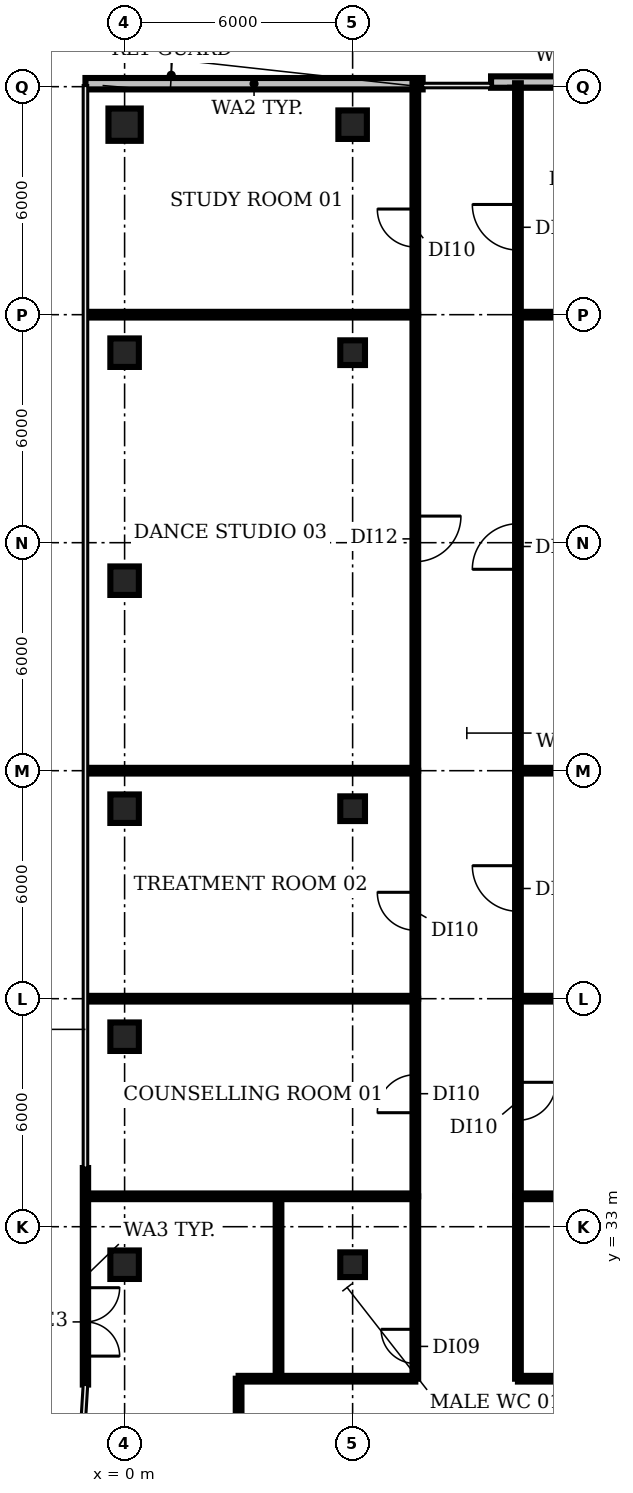
"""IFC4 building model, lengths in metres.
Left out: names, types, materials, properties, quantities, classifications, styles, units other than length and angle.
Written with IfcOpenShell. Run it as: python <this file> out.ifc"""

import sys

from ifc_helpers import new_model, si_unit, direction, frame, frame_2d, origin, origin_2d, place, context, subcontext, project, spatial, rectangle, circle, extrude, element, fill, save


model = new_model("IFC4")
c1 = context("Model", 3, precision=1e-05, world=origin(), true_north=direction((0.0, 1.0)))
c2 = subcontext(c1, "Body", "Model", "MODEL_VIEW")
j1 = project(units=[si_unit("LENGTHUNIT", "METRE"), si_unit("PLANEANGLEUNIT", "RADIAN")], contexts=[c1])
p1 = place(None, origin())
s1 = spatial("IfcSite", under=j1, at=p1, CompositionType="ELEMENT")
p2 = place(p1, origin())
s2 = spatial("IfcBuilding", under=s1, at=p2, CompositionType="ELEMENT")
p3 = place(p2, frame((0.0, 0.0, 272.6)))
s3 = spatial("IfcBuildingStorey", under=s2, at=p3, CompositionType="ELEMENT", Elevation=272.6)
for number, where, z_axis, x_axis in (
    (1, (0.0, 32.0, 0.0), (0.0, 0.0, 1.0), (1.0, 0.0, 0.0)),
    (2, (0.0, 38.0, 0.0), (0.0, 0.0, 1.0), (1.0, 0.0, 0.0)),
    (3, (0.0, 44.0, 0.0), (0.0, 0.0, 1.0), (1.0, 0.0, 0.0)),
    (4, (0.0, 50.0, 0.0), (0.0, 0.0, 1.0), (1.0, 0.0, 0.0)),
    (5, (0.0, 56.0, 0.0), (0.0, 0.0, 1.0), (1.0, 0.0, 0.0)),
):
    element("IfcColumn", number, at=place(p3, frame(where, z_axis=z_axis, x_axis=x_axis)), inside=s3, PredefinedType="COLUMN", context=c2, shape_type="SweptSolid", body=[
        extrude(rectangle(XDim=0.75, YDim=0.75, at=origin_2d()), origin(), (0.0, 0.0, 1.0), 3.85),
    ])
p4 = place(p3, frame((0.0, 62.0, 0.0), z_axis=(0.0, 0.0, 1.0), x_axis=(1.0, 0.0, 0.0)))
e6 = element("IfcColumn", 6, at=p4, inside=s3, PredefinedType="COLUMN", context=c2, shape_type="SweptSolid", body=[
    extrude(circle(Radius=0.425, at=origin_2d()), origin(), (0.0, 0.0, 1.0), 3.85),
])
for number, where, z_axis, x_axis in (
    (7, (6.0, 32.0, 0.0), (0.0, 0.0, 1.0), (1.0, 0.0, 0.0)),
    (8, (6.0, 44.0, 0.0), (0.0, 0.0, 1.0), (1.0, 0.0, 0.0)),
    (9, (6.0, 56.0, 0.0), (0.0, 0.0, 1.0), (1.0, 0.0, 0.0)),
):
    element("IfcColumn", number, at=place(p3, frame(where, z_axis=z_axis, x_axis=x_axis)), inside=s3, PredefinedType="COLUMN", context=c2, shape_type="SweptSolid", body=[
        extrude(rectangle(XDim=0.65, YDim=0.65, at=origin_2d()), origin(), (0.0, 0.0, 1.0), 3.85),
    ])
p5 = place(p3, frame((6.0, 62.0, 0.0), z_axis=(0.0, 0.0, 1.0), x_axis=(1.0, 0.0, 0.0)))
e10 = element("IfcColumn", 10, at=p5, inside=s3, PredefinedType="COLUMN", context=c2, shape_type="SweptSolid", body=[
    extrude(rectangle(XDim=0.75, YDim=0.75, at=origin_2d()), origin(), (0.0, 0.0, 1.0), 3.85),
])
p6 = place(p3, frame((14.357, 63.122, 0.0), z_axis=(0.0, 0.0, 1.0), x_axis=(-1.0, 0.0, 0.0)))
e11 = element("IfcWall", 11, at=p6, inside=s3, PredefinedType="SOLIDWALL", context=c2, shape_type="SweptSolid", body=[
    extrude(rectangle(XDim=4.715, YDim=0.3, at=frame_2d((2.357, 0.0))), origin(), (0.0, 0.0, 1.0), 3.85),
])
p7 = place(p3, frame((7.843, 63.078, 0.0), z_axis=(0.0, 0.0, 1.0), x_axis=(-1.0, 0.0, 0.0)))
e12 = element("IfcWall", 12, at=p7, inside=s3, PredefinedType="SOLIDWALL", context=c2, shape_type="SweptSolid", body=[
    extrude(rectangle(XDim=8.873, YDim=0.3, at=frame_2d((4.436, 0.0))), origin(), (0.0, 0.0, 1.0), 3.85),
])
p8 = place(p3, frame((-1.03, 34.544, 0.0), z_axis=(0.0, 0.0, 1.0), x_axis=(0.0, -1.0, 0.0)))
e13 = element("IfcWall", 13, at=p8, inside=s3, PredefinedType="SOLIDWALL", context=c2, shape_type="SweptSolid", body=[
    extrude(rectangle(XDim=5.697, YDim=0.14, at=frame_2d((2.849, 0.0))), origin(), (0.0, 0.0, 1.0), 3.85),
])
p9 = place(p8, frame((3.149, 0.0, 0.0)))
e14 = element("IfcOpeningElement", 14, at=p9, cuts=e13, PredefinedType="OPENING", context=c2, shape_type="SweptSolid", body=[
    extrude(rectangle(XDim=1.8, YDim=2.4, at=frame_2d((0.9, 1.2))), frame((0.0, 0.08, 0.0), z_axis=(0.0, -1.0, 0.0), x_axis=(1.0, 0.0, 0.0)), (0.0, 0.0, 1.0), 0.16),
])
for number, where, z_axis, x_axis in (
    (15, (-0.98, 33.8, 0.0), (0.0, 0.0, 1.0), (1.0, 0.0, 0.0)),
    (16, (-0.98, 39.0, 0.0), (0.0, 0.0, 1.0), (1.0, 0.0, 0.0)),
    (17, (-0.98, 45.0, 0.0), (0.0, 0.0, 1.0), (1.0, 0.0, 0.0)),
    (18, (-0.98, 57.0, 0.0), (0.0, 0.0, 1.0), (1.0, 0.0, 0.0)),
):
    element("IfcWall", number, at=place(p3, frame(where, z_axis=z_axis, x_axis=x_axis)), inside=s3, PredefinedType="PARTITIONING", context=c2, shape_type="SweptSolid", body=[
        extrude(rectangle(XDim=8.63, YDim=0.15, at=frame_2d((4.315, 0.0))), origin(), (0.0, 0.0, 1.0), 2.9),
    ])
p10 = place(p3, frame((3.0, 25.1, 0.0), z_axis=(0.0, 0.0, 1.0), x_axis=(0.0, 1.0, 0.0)))
e19 = element("IfcWall", 19, at=p10, inside=s3, PredefinedType="PARTITIONING", context=c2, shape_type="SweptSolid", body=[
    extrude(rectangle(XDim=3.9, YDim=0.15, at=frame_2d((1.95, 0.0))), origin(), (0.0, 0.0, 1.0), 2.9),
])
p11 = place(p3, frame((3.0, 29.0, 0.0), z_axis=(0.0, 0.0, 1.0), x_axis=(1.0, 0.0, 0.0)))
e20 = element("IfcWall", 20, at=p11, inside=s3, PredefinedType="PARTITIONING", context=c2, shape_type="SweptSolid", body=[
    extrude(rectangle(XDim=4.65, YDim=0.15, at=frame_2d((2.325, 0.0))), origin(), (0.0, 0.0, 1.0), 2.9),
])
p12 = place(p3, frame((4.05, 29.0, 0.0), z_axis=(0.0, 0.0, 1.0), x_axis=(0.0, 1.0, 0.0)))
e21 = element("IfcWall", 21, at=p12, inside=s3, PredefinedType="PARTITIONING", context=c2, shape_type="SweptSolid", body=[
    extrude(rectangle(XDim=4.8, YDim=0.15, at=frame_2d((2.4, 0.0))), origin(), (0.0, 0.0, 1.0), 2.9),
])
p13 = place(p3, frame((7.65, 29.0, 0.0), z_axis=(0.0, 0.0, 1.0), x_axis=(0.0, 1.0, 0.0)))
e22 = element("IfcWall", 22, at=p13, inside=s3, PredefinedType="PARTITIONING", context=c2, shape_type="SweptSolid", body=[
    extrude(rectangle(XDim=4.8, YDim=0.15, at=frame_2d((2.4, 0.0))), origin(), (0.0, 0.0, 1.0), 2.9),
])
p14 = place(p13, frame((0.4, 0.0, 0.0)))
e23 = element("IfcOpeningElement", 23, at=p14, cuts=e22, PredefinedType="OPENING", context=c2, shape_type="SweptSolid", body=[
    extrude(rectangle(XDim=0.9, YDim=2.1, at=frame_2d((0.45, 1.05))), frame((0.0, 0.085, 0.0), z_axis=(0.0, -1.0, 0.0), x_axis=(1.0, 0.0, 0.0)), (0.0, 0.0, 1.0), 0.17),
])
p15 = place(p3, frame((7.65, 33.8, 0.0), z_axis=(0.0, 0.0, 1.0), x_axis=(0.0, 1.0, 0.0)))
e24 = element("IfcWall", 24, at=p15, inside=s3, PredefinedType="PARTITIONING", context=c2, shape_type="SweptSolid", body=[
    extrude(rectangle(XDim=5.2, YDim=0.15, at=frame_2d((2.6, 0.0))), origin(), (0.0, 0.0, 1.0), 2.9),
])
p16 = place(p15, frame((2.2, 0.0, 0.0)))
e25 = element("IfcOpeningElement", 25, at=p16, cuts=e24, PredefinedType="OPENING", context=c2, shape_type="SweptSolid", body=[
    extrude(rectangle(XDim=1.0, YDim=2.1, at=frame_2d((0.5, 1.05))), frame((0.0, 0.085, 0.0), z_axis=(0.0, -1.0, 0.0), x_axis=(1.0, 0.0, 0.0)), (0.0, 0.0, 1.0), 0.17),
])
p17 = place(p3, frame((7.65, 39.0, 0.0), z_axis=(0.0, 0.0, 1.0), x_axis=(0.0, 1.0, 0.0)))
e26 = element("IfcWall", 26, at=p17, inside=s3, PredefinedType="PARTITIONING", context=c2, shape_type="SweptSolid", body=[
    extrude(rectangle(XDim=6.0, YDim=0.15, at=frame_2d((3.0, 0.0))), origin(), (0.0, 0.0, 1.0), 2.9),
])
p18 = place(p17, frame((1.8, 0.0, 0.0)))
e27 = element("IfcOpeningElement", 27, at=p18, cuts=e26, PredefinedType="OPENING", context=c2, shape_type="SweptSolid", body=[
    extrude(rectangle(XDim=1.0, YDim=2.1, at=frame_2d((0.5, 1.05))), frame((0.0, 0.085, 0.0), z_axis=(0.0, -1.0, 0.0), x_axis=(1.0, 0.0, 0.0)), (0.0, 0.0, 1.0), 0.17),
])
p19 = place(p3, frame((7.65, 57.0, 0.0), z_axis=(0.0, 0.0, 1.0), x_axis=(0.0, -1.0, 0.0)))
e28 = element("IfcWall", 28, at=p19, inside=s3, PredefinedType="PARTITIONING", context=c2, shape_type="SweptSolid", body=[
    extrude(rectangle(XDim=12.0, YDim=0.15, at=frame_2d((6.0, 0.0))), origin(), (0.0, 0.0, 1.0), 2.9),
])
p20 = place(p19, frame((5.3, 0.0, 0.0)))
e29 = element("IfcOpeningElement", 29, at=p20, cuts=e28, PredefinedType="OPENING", context=c2, shape_type="SweptSolid", body=[
    extrude(rectangle(XDim=1.2, YDim=2.1, at=frame_2d((0.6, 1.05))), frame((0.0, 0.085, 0.0), z_axis=(0.0, -1.0, 0.0), x_axis=(1.0, 0.0, 0.0)), (0.0, 0.0, 1.0), 0.17),
])
p21 = place(p3, frame((7.65, 57.0, 0.0), z_axis=(0.0, 0.0, 1.0), x_axis=(0.0, 1.0, 0.0)))
e30 = element("IfcWall", 30, at=p21, inside=s3, PredefinedType="PARTITIONING", context=c2, shape_type="SweptSolid", body=[
    extrude(rectangle(XDim=6.09, YDim=0.15, at=frame_2d((3.045, 0.0))), origin(), (0.0, 0.0, 1.0), 2.9),
])
p22 = place(p21, frame((1.78, 0.0, 0.0)))
e31 = element("IfcOpeningElement", 31, at=p22, cuts=e30, PredefinedType="OPENING", context=c2, shape_type="SweptSolid", body=[
    extrude(rectangle(XDim=1.0, YDim=2.1, at=frame_2d((0.5, 1.05))), frame((0.0, 0.085, 0.0), z_axis=(0.0, -1.0, 0.0), x_axis=(1.0, 0.0, 0.0)), (0.0, 0.0, 1.0), 0.17),
])
p23 = place(p3, frame((10.35, 29.0, 0.0), z_axis=(0.0, 0.0, 1.0), x_axis=(0.0, 1.0, 0.0)))
e32 = element("IfcWall", 32, at=p23, inside=s3, PredefinedType="PARTITIONING", context=c2, shape_type="SweptSolid", body=[
    extrude(rectangle(XDim=4.8, YDim=0.15, at=frame_2d((2.4, 0.0))), origin(), (0.0, 0.0, 1.0), 2.9),
])
p24 = place(p3, frame((10.35, 29.0, 0.0), z_axis=(0.0, 0.0, 1.0), x_axis=(1.0, 0.0, 0.0)))
e33 = element("IfcWall", 33, at=p24, inside=s3, PredefinedType="PARTITIONING", context=c2, shape_type="SweptSolid", body=[
    extrude(rectangle(XDim=4.05, YDim=0.15, at=frame_2d((2.025, 0.0))), origin(), (0.0, 0.0, 1.0), 2.9),
])
p25 = place(p3, frame((10.35, 33.8, 0.0), z_axis=(0.0, 0.0, 1.0), x_axis=(1.0, 0.0, 0.0)))
e34 = element("IfcWall", 34, at=p25, inside=s3, PredefinedType="PARTITIONING", context=c2, shape_type="SweptSolid", body=[
    extrude(rectangle(XDim=11.38, YDim=0.15, at=frame_2d((5.69, 0.0))), origin(), (0.0, 0.0, 1.0), 2.9),
])
p26 = place(p3, frame((10.35, 39.0, 0.0), z_axis=(0.0, 0.0, 1.0), x_axis=(0.0, -1.0, 0.0)))
e35 = element("IfcWall", 35, at=p26, inside=s3, PredefinedType="PARTITIONING", context=c2, shape_type="SweptSolid", body=[
    extrude(rectangle(XDim=5.2, YDim=0.15, at=frame_2d((2.6, 0.0))), origin(), (0.0, 0.0, 1.0), 2.9),
])
p27 = place(p26, frame((2.2, 0.0, 0.0)))
e36 = element("IfcOpeningElement", 36, at=p27, cuts=e35, PredefinedType="OPENING", context=c2, shape_type="SweptSolid", body=[
    extrude(rectangle(XDim=1.0, YDim=2.1, at=frame_2d((0.5, 1.05))), frame((0.0, 0.085, 0.0), z_axis=(0.0, -1.0, 0.0), x_axis=(1.0, 0.0, 0.0)), (0.0, 0.0, 1.0), 0.17),
])
p28 = place(p3, frame((10.35, 39.0, 0.0), z_axis=(0.0, 0.0, 1.0), x_axis=(0.0, 1.0, 0.0)))
e37 = element("IfcWall", 37, at=p28, inside=s3, PredefinedType="PARTITIONING", context=c2, shape_type="SweptSolid", body=[
    extrude(rectangle(XDim=6.0, YDim=0.15, at=frame_2d((3.0, 0.0))), origin(), (0.0, 0.0, 1.0), 2.9),
])
p29 = place(p28, frame((2.3, 0.0, 0.0)))
e38 = element("IfcOpeningElement", 38, at=p29, cuts=e37, PredefinedType="OPENING", context=c2, shape_type="SweptSolid", body=[
    extrude(rectangle(XDim=1.2, YDim=2.1, at=frame_2d((0.6, 1.05))), frame((0.0, 0.085, 0.0), z_axis=(0.0, -1.0, 0.0), x_axis=(1.0, 0.0, 0.0)), (0.0, 0.0, 1.0), 0.17),
])
p30 = place(p3, frame((10.35, 39.0, 0.0), z_axis=(0.0, 0.0, 1.0), x_axis=(1.0, 0.0, 0.0)))
e39 = element("IfcWall", 39, at=p30, inside=s3, PredefinedType="PARTITIONING", context=c2, shape_type="SweptSolid", body=[
    extrude(rectangle(XDim=15.3, YDim=0.15, at=frame_2d((7.65, 0.0))), origin(), (0.0, 0.0, 1.0), 2.9),
])
p31 = place(p3, frame((10.35, 45.0, 0.0), z_axis=(0.0, 0.0, 1.0), x_axis=(0.0, 1.0, 0.0)))
e40 = element("IfcWall", 40, at=p31, inside=s3, PredefinedType="PARTITIONING", context=c2, shape_type="SweptSolid", body=[
    extrude(rectangle(XDim=12.0, YDim=0.15, at=frame_2d((6.0, 0.0))), origin(), (0.0, 0.0, 1.0), 2.9),
])
p32 = place(p31, frame((5.3, 0.0, 0.0)))
e41 = element("IfcOpeningElement", 41, at=p32, cuts=e40, PredefinedType="OPENING", context=c2, shape_type="SweptSolid", body=[
    extrude(rectangle(XDim=1.2, YDim=2.1, at=frame_2d((0.6, 1.05))), frame((0.0, 0.085, 0.0), z_axis=(0.0, -1.0, 0.0), x_axis=(1.0, 0.0, 0.0)), (0.0, 0.0, 1.0), 0.17),
])
p33 = place(p3, frame((10.35, 45.0, 0.0), z_axis=(0.0, 0.0, 1.0), x_axis=(1.0, 0.0, 0.0)))
e42 = element("IfcWall", 42, at=p33, inside=s3, PredefinedType="PARTITIONING", context=c2, shape_type="SweptSolid", body=[
    extrude(rectangle(XDim=15.67, YDim=0.15, at=frame_2d((7.835, 0.0))), origin(), (0.0, 0.0, 1.0), 2.9),
])
p34 = place(p3, frame((10.35, 57.0, 0.0), z_axis=(0.0, 0.0, 1.0), x_axis=(0.0, 1.0, 0.0)))
e43 = element("IfcWall", 43, at=p34, inside=s3, PredefinedType="PARTITIONING", context=c2, shape_type="SweptSolid", body=[
    extrude(rectangle(XDim=6.09, YDim=0.15, at=frame_2d((3.045, 0.0))), origin(), (0.0, 0.0, 1.0), 2.9),
])
p35 = place(p34, frame((1.7, 0.0, 0.0)))
e44 = element("IfcOpeningElement", 44, at=p35, cuts=e43, PredefinedType="OPENING", context=c2, shape_type="SweptSolid", body=[
    extrude(rectangle(XDim=1.2, YDim=2.1, at=frame_2d((0.6, 1.05))), frame((0.0, 0.085, 0.0), z_axis=(0.0, -1.0, 0.0), x_axis=(1.0, 0.0, 0.0)), (0.0, 0.0, 1.0), 0.17),
])
p36 = place(p3, frame((10.35, 57.0, 0.0), z_axis=(0.0, 0.0, 1.0), x_axis=(1.0, 0.0, 0.0)))
e45 = element("IfcWall", 45, at=p36, inside=s3, PredefinedType="PARTITIONING", context=c2, shape_type="SweptSolid", body=[
    extrude(rectangle(XDim=16.4, YDim=0.15, at=frame_2d((8.2, 0.0))), origin(), (0.0, 0.0, 1.0), 2.9),
])
p37 = place(p9, origin())
e46 = element("IfcDoor", 46, at=p37, inside=s3, OperationType="DOUBLE_DOOR_DOUBLE_SWING", PredefinedType="DOOR", context=c2, shape_type="SweptSolid", body=[
    extrude(rectangle(XDim=1.8, YDim=2.4, at=frame_2d((0.9, 1.2))), frame((0.0, 0.025, 0.0), z_axis=(0.0, -1.0, 0.0), x_axis=(1.0, 0.0, 0.0)), (0.0, 0.0, 1.0), 0.05),
])
fill(e14, e46)
p38 = place(p14, origin())
e47 = element("IfcDoor", 47, at=p38, inside=s3, OperationType="SINGLE_SWING_RIGHT", PredefinedType="DOOR", context=c2, shape_type="SweptSolid", body=[
    extrude(rectangle(XDim=0.9, YDim=2.1, at=frame_2d((0.45, 1.05))), frame((0.0, 0.025, 0.0), z_axis=(0.0, -1.0, 0.0), x_axis=(1.0, 0.0, 0.0)), (0.0, 0.0, 1.0), 0.05),
])
fill(e23, e47)
p39 = place(p16, origin())
e48 = element("IfcDoor", 48, at=p39, inside=s3, OperationType="SINGLE_SWING_LEFT", PredefinedType="DOOR", context=c2, shape_type="SweptSolid", body=[
    extrude(rectangle(XDim=1.0, YDim=2.1, at=frame_2d((0.5, 1.05))), frame((0.0, 0.025, 0.0), z_axis=(0.0, -1.0, 0.0), x_axis=(1.0, 0.0, 0.0)), (0.0, 0.0, 1.0), 0.05),
])
fill(e25, e48)
p40 = place(p18, origin())
e49 = element("IfcDoor", 49, at=p40, inside=s3, OperationType="SINGLE_SWING_RIGHT", PredefinedType="DOOR", context=c2, shape_type="SweptSolid", body=[
    extrude(rectangle(XDim=1.0, YDim=2.1, at=frame_2d((0.5, 1.05))), frame((0.0, 0.025, 0.0), z_axis=(0.0, -1.0, 0.0), x_axis=(1.0, 0.0, 0.0)), (0.0, 0.0, 1.0), 0.05),
])
fill(e27, e49)
p41 = place(p20, origin())
e50 = element("IfcDoor", 50, at=p41, inside=s3, OperationType="SINGLE_SWING_LEFT", PredefinedType="DOOR", context=c2, shape_type="SweptSolid", body=[
    extrude(rectangle(XDim=1.2, YDim=2.1, at=frame_2d((0.6, 1.05))), frame((0.0, 0.025, 0.0), z_axis=(0.0, -1.0, 0.0), x_axis=(1.0, 0.0, 0.0)), (0.0, 0.0, 1.0), 0.05),
])
fill(e29, e50)
p42 = place(p22, origin())
e51 = element("IfcDoor", 51, at=p42, inside=s3, OperationType="SINGLE_SWING_RIGHT", PredefinedType="DOOR", context=c2, shape_type="SweptSolid", body=[
    extrude(rectangle(XDim=1.0, YDim=2.1, at=frame_2d((0.5, 1.05))), frame((0.0, 0.025, 0.0), z_axis=(0.0, -1.0, 0.0), x_axis=(1.0, 0.0, 0.0)), (0.0, 0.0, 1.0), 0.05),
])
fill(e31, e51)
p43 = place(p27, origin())
e52 = element("IfcDoor", 52, at=p43, inside=s3, OperationType="SINGLE_SWING_LEFT", PredefinedType="DOOR", context=c2, shape_type="SweptSolid", body=[
    extrude(rectangle(XDim=1.0, YDim=2.1, at=frame_2d((0.5, 1.05))), frame((0.0, 0.025, 0.0), z_axis=(0.0, -1.0, 0.0), x_axis=(1.0, 0.0, 0.0)), (0.0, 0.0, 1.0), 0.05),
])
fill(e36, e52)
p44 = place(p29, origin())
e53 = element("IfcDoor", 53, at=p44, inside=s3, OperationType="SINGLE_SWING_RIGHT", PredefinedType="DOOR", context=c2, shape_type="SweptSolid", body=[
    extrude(rectangle(XDim=1.2, YDim=2.1, at=frame_2d((0.6, 1.05))), frame((0.0, 0.025, 0.0), z_axis=(0.0, -1.0, 0.0), x_axis=(1.0, 0.0, 0.0)), (0.0, 0.0, 1.0), 0.05),
])
fill(e38, e53)
p45 = place(p32, origin())
e54 = element("IfcDoor", 54, at=p45, inside=s3, OperationType="SINGLE_SWING_LEFT", PredefinedType="DOOR", context=c2, shape_type="SweptSolid", body=[
    extrude(rectangle(XDim=1.2, YDim=2.1, at=frame_2d((0.6, 1.05))), frame((0.0, 0.025, 0.0), z_axis=(0.0, -1.0, 0.0), x_axis=(1.0, 0.0, 0.0)), (0.0, 0.0, 1.0), 0.05),
])
fill(e41, e54)
p46 = place(p35, origin())
e55 = element("IfcDoor", 55, at=p46, inside=s3, OperationType="SINGLE_SWING_RIGHT", PredefinedType="DOOR", context=c2, shape_type="SweptSolid", body=[
    extrude(rectangle(XDim=1.2, YDim=2.1, at=frame_2d((0.6, 1.05))), frame((0.0, 0.025, 0.0), z_axis=(0.0, -1.0, 0.0), x_axis=(1.0, 0.0, 0.0)), (0.0, 0.0, 1.0), 0.05),
])
fill(e44, e55)
save(model, sys.argv[1])
